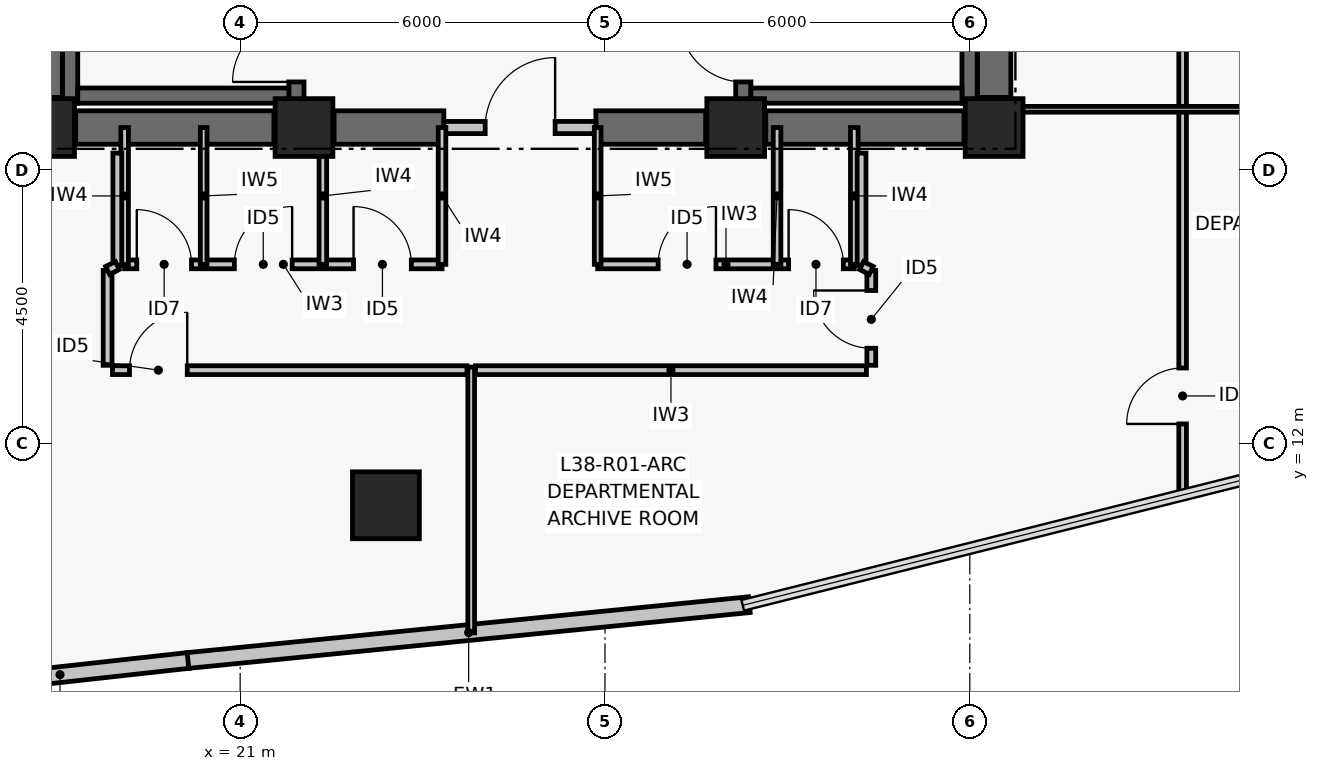
"""IFC4 building model, lengths in metres.
Left out: names, types, materials, properties, quantities, classifications, styles, units other than length and angle.
Written with IfcOpenShell. Run it as: python <this file> out.ifc"""

import sys

from ifc_helpers import new_model, si_unit, direction, frame, frame_2d, origin, origin_2d, place, context, subcontext, project, spatial, rectangle, hollow_rectangle, extrude, element, fill, save


model = new_model("IFC4")
c1 = context("Model", 3, precision=1e-05, world=origin(), true_north=direction((0.0, 1.0)))
c2 = subcontext(c1, "Body", "Model", "MODEL_VIEW")
j1 = project(units=[si_unit("LENGTHUNIT", "METRE"), si_unit("PLANEANGLEUNIT", "RADIAN")], contexts=[c1])
p1 = place(None, origin())
s1 = spatial("IfcSite", under=j1, at=p1, CompositionType="ELEMENT")
p2 = place(p1, origin())
s2 = spatial("IfcBuilding", under=s1, at=p2, CompositionType="ELEMENT")
p3 = place(p2, frame((0.0, 0.0, 154.32)))
s3 = spatial("IfcBuildingStorey", under=s2, at=p3, CompositionType="ELEMENT", Elevation=154.32)
for number, where, z_axis, x_axis in (
    (1, (17.8, 17.2, 0.0), (0.0, 0.0, 1.0), (1.0, 0.0, 0.0)),
    (2, (22.05, 17.2, 0.0), (0.0, 0.0, 1.0), (1.0, 0.0, 0.0)),
    (3, (29.15, 17.2, 0.0), (0.0, 0.0, 1.0), (1.0, 0.0, 0.0)),
    (4, (33.4, 17.2, 0.0), (0.0, 0.0, 1.0), (1.0, 0.0, 0.0)),
):
    element("IfcColumn", number, at=place(p3, frame(where, z_axis=z_axis, x_axis=x_axis)), inside=s3, PredefinedType="COLUMN", context=c2, shape_type="SweptSolid", body=[
        extrude(rectangle(XDim=0.95, YDim=0.95, at=origin_2d()), origin(), (0.0, 0.0, 1.0), 3.72),
    ])
p4 = place(p3, frame((18.295, 17.2, 0.0), z_axis=(0.0, 0.0, 1.0), x_axis=(1.0, 0.0, 0.0)))
e5 = element("IfcWall", 5, at=p4, inside=s3, PredefinedType="SHEAR", context=c2, shape_type="SweptSolid", body=[
    extrude(rectangle(XDim=3.26, YDim=0.55, at=frame_2d((1.63, 0.0))), origin(), (0.0, 0.0, 1.0), 3.5),
])
p5 = place(p3, frame((22.545, 17.2, 0.0), z_axis=(0.0, 0.0, 1.0), x_axis=(1.0, 0.0, 0.0)))
e6 = element("IfcWall", 6, at=p5, inside=s3, PredefinedType="SHEAR", context=c2, shape_type="SweptSolid", body=[
    extrude(rectangle(XDim=1.805, YDim=0.55, at=frame_2d((0.903, 0.0))), origin(), (0.0, 0.0, 1.0), 3.5),
])
p6 = place(p3, frame((26.85, 17.2, 0.0), z_axis=(0.0, 0.0, 1.0), x_axis=(1.0, 0.0, 0.0)))
e7 = element("IfcWall", 7, at=p6, inside=s3, PredefinedType="SHEAR", context=c2, shape_type="SweptSolid", body=[
    extrude(rectangle(XDim=1.805, YDim=0.55, at=frame_2d((0.902, 0.0))), origin(), (0.0, 0.0, 1.0), 3.5),
])
p7 = place(p3, frame((29.645, 17.2, 0.0), z_axis=(0.0, 0.0, 1.0), x_axis=(1.0, 0.0, 0.0)))
e8 = element("IfcWall", 8, at=p7, inside=s3, PredefinedType="SHEAR", context=c2, shape_type="SweptSolid", body=[
    extrude(rectangle(XDim=3.26, YDim=0.55, at=frame_2d((1.63, 0.0))), origin(), (0.0, 0.0, 1.0), 3.5),
])
for number, where, z_axis, x_axis in (
    (9, (17.8, 17.695, 0.0), (0.0, 0.0, 1.0), (0.0, 1.0, 0.0)),
    (10, (33.4, 17.695, 0.0), (0.0, 0.0, 1.0), (0.0, 1.0, 0.0)),
):
    element("IfcWall", number, at=place(p3, frame(where, z_axis=z_axis, x_axis=x_axis)), inside=s3, PredefinedType="SHEAR", context=c2, shape_type="SweptSolid", body=[
        extrude(rectangle(XDim=8.61, YDim=0.55, at=frame_2d((4.305, 0.0))), origin(), (0.0, 0.0, 1.0), 3.5),
    ])
p8 = place(p3, frame((18.204, 17.6, 0.0), z_axis=(0.0, 0.0, 1.0), x_axis=(0.0, 1.0, 0.0)))
e11 = element("IfcWall", 11, at=p8, inside=s3, PredefinedType="SHEAR", context=c2, shape_type="SweptSolid", body=[
    extrude(rectangle(XDim=8.8, YDim=0.25, at=frame_2d((4.4, 0.0))), origin(), (0.0, 0.0, 1.0), 3.5),
])
p9 = place(p3, frame((21.925, 17.6, 0.0), z_axis=(0.0, 0.0, 1.0), x_axis=(0.0, 1.0, 0.0)))
e12 = element("IfcWall", 12, at=p9, inside=s3, PredefinedType="SHEAR", context=c2, shape_type="SweptSolid", body=[
    extrude(rectangle(XDim=8.8, YDim=0.25, at=frame_2d((4.4, 0.0))), origin(), (0.0, 0.0, 1.0), 3.5),
])
p10 = place(p9, frame((0.35, 0.0, 0.0)))
e13 = element("IfcOpeningElement", 13, at=p10, cuts=e12, PredefinedType="OPENING", context=c2, shape_type="SweptSolid", body=[
    extrude(rectangle(XDim=1.05, YDim=2.08, at=frame_2d((0.525, 1.04))), frame((0.0, 0.135, 0.0), z_axis=(0.0, -1.0, 0.0), x_axis=(1.0, 0.0, 0.0)), (0.0, 0.0, 1.0), 0.27),
])
p11 = place(p3, frame((18.329, 17.725, 0.0), z_axis=(0.0, 0.0, 1.0), x_axis=(1.0, 0.0, 0.0)))
e14 = element("IfcWall", 14, at=p11, inside=s3, PredefinedType="SHEAR", context=c2, shape_type="SweptSolid", body=[
    extrude(rectangle(XDim=3.471, YDim=0.25, at=frame_2d((1.735, 0.0))), origin(), (0.0, 0.0, 1.0), 3.5),
])
p12 = place(p3, frame((29.275, 17.6, 0.0), z_axis=(0.0, 0.0, 1.0), x_axis=(0.0, 1.0, 0.0)))
e15 = element("IfcWall", 15, at=p12, inside=s3, PredefinedType="SHEAR", context=c2, shape_type="SweptSolid", body=[
    extrude(rectangle(XDim=8.8, YDim=0.25, at=frame_2d((4.4, 0.0))), origin(), (0.0, 0.0, 1.0), 3.5),
])
p13 = place(p12, frame((0.35, 0.0, 0.0)))
e16 = element("IfcOpeningElement", 16, at=p13, cuts=e15, PredefinedType="OPENING", context=c2, shape_type="SweptSolid", body=[
    extrude(rectangle(XDim=1.05, YDim=2.08, at=frame_2d((0.525, 1.04))), frame((0.0, 0.135, 0.0), z_axis=(0.0, -1.0, 0.0), x_axis=(1.0, 0.0, 0.0)), (0.0, 0.0, 1.0), 0.27),
])
p14 = place(p3, frame((32.996, 17.6, 0.0), z_axis=(0.0, 0.0, 1.0), x_axis=(0.0, 1.0, 0.0)))
e17 = element("IfcWall", 17, at=p14, inside=s3, PredefinedType="SHEAR", context=c2, shape_type="SweptSolid", body=[
    extrude(rectangle(XDim=8.8, YDim=0.25, at=frame_2d((4.4, 0.0))), origin(), (0.0, 0.0, 1.0), 3.5),
])
p15 = place(p3, frame((29.4, 17.725, 0.0), z_axis=(0.0, 0.0, 1.0), x_axis=(1.0, 0.0, 0.0)))
e18 = element("IfcWall", 18, at=p15, inside=s3, PredefinedType="SHEAR", context=c2, shape_type="SweptSolid", body=[
    extrude(rectangle(XDim=3.471, YDim=0.25, at=frame_2d((1.736, 0.0))), origin(), (0.0, 0.0, 1.0), 3.5),
])
p16 = place(p3, frame((23.397, 10.988, 0.0), z_axis=(0.0, 0.0, 1.0), x_axis=(1.0, 0.0, 0.0)))
e19 = element("IfcColumn", 19, at=p16, inside=s3, PredefinedType="COLUMN", context=c2, shape_type="SweptSolid", body=[
    extrude(hollow_rectangle(XDim=1.1, YDim=1.1, WallThickness=0.045, at=origin_2d()), origin(), (0.0, 0.0, 1.0), 3.72),
])
p17 = place(p3, frame((20.153, 8.437, 0.0), z_axis=(0.0, 0.0, 1.0), x_axis=(-0.993933978819, -0.109978387641, 0.0)))
e20 = element("IfcWall", 20, at=p17, inside=s3, PredefinedType="PARTITIONING", context=c2, shape_type="SweptSolid", body=[
    extrude(rectangle(XDim=4.258, YDim=0.26, at=frame_2d((2.129, 0.0))), origin(), (0.0, 0.0, 1.0), 3.5),
])
p18 = place(p3, frame((29.375, 9.354, 0.0), z_axis=(0.0, 0.0, 1.0), x_axis=(-0.9950896707, -0.098977508888, 0.0)))
e21 = element("IfcWall", 21, at=p18, inside=s3, PredefinedType="PARTITIONING", context=c2, shape_type="SweptSolid", body=[
    extrude(rectangle(XDim=9.28, YDim=0.26, at=frame_2d((4.64, 0.0))), origin(), (0.0, 0.0, 1.0), 3.5),
])
p19 = place(p3, frame((24.35, 17.2, 0.0), z_axis=(0.0, 0.0, 1.0), x_axis=(1.0, 0.0, 0.0)))
e22 = element("IfcWall", 22, at=p19, inside=s3, PredefinedType="PARTITIONING", context=c2, shape_type="SweptSolid", body=[
    extrude(rectangle(XDim=2.5, YDim=0.2, at=frame_2d((1.25, 0.0))), origin(), (0.0, 0.0, 1.0), 2.63),
])
p20 = place(p19, frame((0.68, 0.0, 0.0)))
e23 = element("IfcOpeningElement", 23, at=p20, cuts=e22, PredefinedType="OPENING", context=c2, shape_type="SweptSolid", body=[
    extrude(rectangle(XDim=1.15, YDim=2.08, at=frame_2d((0.575, 1.04))), frame((0.0, 0.11, 0.0), z_axis=(0.0, -1.0, 0.0), x_axis=(1.0, 0.0, 0.0)), (0.0, 0.0, 1.0), 0.22),
])
p21 = place(p3, frame((19.1, 14.95, 0.0), z_axis=(0.0, 0.0, 1.0), x_axis=(1.0, 0.0, 0.0)))
e24 = element("IfcWall", 24, at=p21, inside=s3, PredefinedType="PARTITIONING", context=c2, shape_type="SweptSolid", body=[
    extrude(rectangle(XDim=5.22, YDim=0.145, at=frame_2d((2.61, 0.0))), origin(), (0.0, 0.0, 1.0), 2.73),
])
p22 = place(p21, frame((0.2, 0.0, 0.0)))
e25 = element("IfcOpeningElement", 25, at=p22, cuts=e24, PredefinedType="OPENING", context=c2, shape_type="SweptSolid", body=[
    extrude(rectangle(XDim=0.9, YDim=2.02, at=frame_2d((0.45, 1.01))), frame((0.0, 0.083, 0.0), z_axis=(0.0, -1.0, 0.0), x_axis=(1.0, 0.0, 0.0)), (0.0, 0.0, 1.0), 0.165),
])
p23 = place(p21, frame((1.805, 0.0, 0.0)))
e26 = element("IfcOpeningElement", 26, at=p23, cuts=e24, PredefinedType="OPENING", context=c2, shape_type="SweptSolid", body=[
    extrude(rectangle(XDim=0.95, YDim=2.06, at=frame_2d((0.475, 1.03))), frame((0.0, 0.083, 0.0), z_axis=(0.0, -1.0, 0.0), x_axis=(1.0, 0.0, 0.0)), (0.0, 0.0, 1.0), 0.165),
])
p24 = place(p21, frame((3.765, 0.0, 0.0)))
e27 = element("IfcOpeningElement", 27, at=p24, cuts=e24, PredefinedType="OPENING", context=c2, shape_type="SweptSolid", body=[
    extrude(rectangle(XDim=0.95, YDim=2.06, at=frame_2d((0.475, 1.03))), frame((0.0, 0.083, 0.0), z_axis=(0.0, -1.0, 0.0), x_axis=(1.0, 0.0, 0.0)), (0.0, 0.0, 1.0), 0.165),
])
p25 = place(p3, frame((26.88, 14.95, 0.0), z_axis=(0.0, 0.0, 1.0), x_axis=(1.0, 0.0, 0.0)))
e28 = element("IfcWall", 28, at=p25, inside=s3, PredefinedType="PARTITIONING", context=c2, shape_type="SweptSolid", body=[
    extrude(rectangle(XDim=4.22, YDim=0.145, at=frame_2d((2.11, 0.0))), origin(), (0.0, 0.0, 1.0), 2.93),
])
p26 = place(p25, frame((0.995, 0.0, 0.0)))
e29 = element("IfcOpeningElement", 29, at=p26, cuts=e28, PredefinedType="OPENING", context=c2, shape_type="SweptSolid", body=[
    extrude(rectangle(XDim=0.95, YDim=2.06, at=frame_2d((0.475, 1.03))), frame((0.0, 0.083, 0.0), z_axis=(0.0, -1.0, 0.0), x_axis=(1.0, 0.0, 0.0)), (0.0, 0.0, 1.0), 0.165),
])
p27 = place(p25, frame((3.14, 0.0, 0.0)))
e30 = element("IfcOpeningElement", 30, at=p27, cuts=e28, PredefinedType="OPENING", context=c2, shape_type="SweptSolid", body=[
    extrude(rectangle(XDim=0.9, YDim=2.02, at=frame_2d((0.45, 1.01))), frame((0.0, 0.083, 0.0), z_axis=(0.0, -1.0, 0.0), x_axis=(1.0, 0.0, 0.0)), (0.0, 0.0, 1.0), 0.165),
])
p28 = place(p3, frame((19.1, 14.95, 0.0), z_axis=(0.0, 0.0, 1.0), x_axis=(0.0, 1.0, 0.0)))
e31 = element("IfcWall", 31, at=p28, inside=s3, PredefinedType="PARTITIONING", context=c2, shape_type="SweptSolid", body=[
    extrude(rectangle(XDim=2.25, YDim=0.125, at=frame_2d((1.125, 0.0))), origin(), (0.0, 0.0, 1.0), 2.63),
])
p29 = place(p3, frame((20.4, 14.95, 0.0), z_axis=(0.0, 0.0, 1.0), x_axis=(0.0, 1.0, 0.0)))
e32 = element("IfcWall", 32, at=p29, inside=s3, PredefinedType="PARTITIONING", context=c2, shape_type="SweptSolid", body=[
    extrude(rectangle(XDim=2.25, YDim=0.11, at=frame_2d((1.125, 0.0))), origin(), (0.0, 0.0, 1.0), 2.63),
])
for number, where, z_axis, x_axis in (
    (33, (22.36, 14.95, 0.0), (0.0, 0.0, 1.0), (0.0, 1.0, 0.0)),
    (34, (24.32, 14.95, 0.0), (0.0, 0.0, 1.0), (0.0, 1.0, 0.0)),
):
    element("IfcWall", number, at=place(p3, frame(where, z_axis=z_axis, x_axis=x_axis)), inside=s3, PredefinedType="PARTITIONING", context=c2, shape_type="SweptSolid", body=[
        extrude(rectangle(XDim=2.25, YDim=0.125, at=frame_2d((1.125, 0.0))), origin(), (0.0, 0.0, 1.0), 2.63),
    ])
p30 = place(p3, frame((26.88, 14.95, 0.0), z_axis=(0.0, 0.0, 1.0), x_axis=(0.0, 1.0, 0.0)))
e35 = element("IfcWall", 35, at=p30, inside=s3, PredefinedType="PARTITIONING", context=c2, shape_type="SweptSolid", body=[
    extrude(rectangle(XDim=2.25, YDim=0.11, at=frame_2d((1.125, 0.0))), origin(), (0.0, 0.0, 1.0), 2.63),
])
for number, where, z_axis, x_axis in (
    (36, (29.83, 14.95, 0.0), (0.0, 0.0, 1.0), (0.0, 1.0, 0.0)),
    (37, (31.1, 14.95, 0.0), (0.0, 0.0, 1.0), (0.0, 1.0, 0.0)),
):
    element("IfcWall", number, at=place(p3, frame(where, z_axis=z_axis, x_axis=x_axis)), inside=s3, PredefinedType="PARTITIONING", context=c2, shape_type="SweptSolid", body=[
        extrude(rectangle(XDim=2.25, YDim=0.125, at=frame_2d((1.125, 0.0))), origin(), (0.0, 0.0, 1.0), 2.63),
    ])
p31 = place(p3, frame((24.87, 13.21, 0.0), z_axis=(0.0, 0.0, 1.0), x_axis=(1.0, 0.0, 0.0)))
e38 = element("IfcWall", 38, at=p31, inside=s3, PredefinedType="PARTITIONING", context=c2, shape_type="SweptSolid", body=[
    extrude(rectangle(XDim=6.43, YDim=0.145, at=frame_2d((3.215, 0.0))), origin(), (0.0, 0.0, 1.0), 2.93),
])
p32 = place(p3, frame((31.38, 13.29, 0.0), z_axis=(0.0, 0.0, 1.0), x_axis=(0.0, 1.0, 0.0)))
e39 = element("IfcWall", 39, at=p32, inside=s3, PredefinedType="PARTITIONING", context=c2, shape_type="SweptSolid", body=[
    extrude(rectangle(XDim=1.56, YDim=0.145, at=frame_2d((0.78, 0.0))), origin(), (0.0, 0.0, 1.0), 3.5),
])
p33 = place(p32, frame((0.28, 0.0, 0.0)))
e40 = element("IfcOpeningElement", 40, at=p33, cuts=e39, PredefinedType="OPENING", context=c2, shape_type="SweptSolid", body=[
    extrude(rectangle(XDim=0.95, YDim=2.06, at=frame_2d((0.475, 1.03))), frame((0.0, 0.083, 0.0), z_axis=(0.0, -1.0, 0.0), x_axis=(1.0, 0.0, 0.0)), (0.0, 0.0, 1.0), 0.165),
])
for number, where, z_axis, x_axis in (
    (41, (31.22, 14.93, 0.0), (0.0, 0.0, 1.0), (0.0, 1.0, 0.0)),
    (42, (18.98, 16.78, 0.0), (0.0, 0.0, 1.0), (0.0, -1.0, 0.0)),
):
    element("IfcWall", number, at=place(p3, frame(where, z_axis=z_axis, x_axis=x_axis)), inside=s3, PredefinedType="PARTITIONING", context=c2, shape_type="SweptSolid", body=[
        extrude(rectangle(XDim=1.85, YDim=0.145, at=frame_2d((0.925, 0.0))), origin(), (0.0, 0.0, 1.0), 2.63),
    ])
p34 = place(p3, frame((18.82, 14.85, 0.0), z_axis=(0.0, 0.0, 1.0), x_axis=(0.0, -1.0, 0.0)))
e43 = element("IfcWall", 43, at=p34, inside=s3, PredefinedType="PARTITIONING", context=c2, shape_type="SweptSolid", body=[
    extrude(rectangle(XDim=1.56, YDim=0.145, at=frame_2d((0.78, 0.0))), origin(), (0.0, 0.0, 1.0), 3.08),
])
p35 = place(p3, frame((18.9, 13.21, 0.0), z_axis=(0.0, 0.0, 1.0), x_axis=(1.0, 0.0, 0.0)))
e44 = element("IfcWall", 44, at=p35, inside=s3, PredefinedType="PARTITIONING", context=c2, shape_type="SweptSolid", body=[
    extrude(rectangle(XDim=5.83, YDim=0.145, at=frame_2d((2.915, 0.0))), origin(), (0.0, 0.0, 1.0), 2.73),
])
p36 = place(p35, frame((0.28, 0.0, 0.0)))
e45 = element("IfcOpeningElement", 45, at=p36, cuts=e44, PredefinedType="OPENING", context=c2, shape_type="SweptSolid", body=[
    extrude(rectangle(XDim=0.95, YDim=2.06, at=frame_2d((0.475, 1.03))), frame((0.0, 0.083, 0.0), z_axis=(0.0, -1.0, 0.0), x_axis=(1.0, 0.0, 0.0)), (0.0, 0.0, 1.0), 0.165),
])
p37 = place(p3, frame((24.8, 8.889, 0.0), z_axis=(0.0, 0.0, 1.0), x_axis=(0.0, 1.0, 0.0)))
e46 = element("IfcWall", 46, at=p37, inside=s3, PredefinedType="PARTITIONING", context=c2, shape_type="SweptSolid", body=[
    extrude(rectangle(XDim=4.371, YDim=0.11, at=frame_2d((2.186, 0.0))), origin(), (0.0, 0.0, 1.0), 2.93),
])
p38 = place(p3, frame((36.5, 11.146, 0.0), z_axis=(0.0, 0.0, 1.0), x_axis=(0.0, 1.0, 0.0)))
e47 = element("IfcWall", 47, at=p38, inside=s3, PredefinedType="PARTITIONING", context=c2, shape_type="SweptSolid", body=[
    extrude(rectangle(XDim=21.708, YDim=0.125, at=frame_2d((10.854, 0.0))), origin(), (0.0, 0.0, 1.0), 2.73),
])
p39 = place(p38, frame((1.18, 0.0, 0.0)))
e48 = element("IfcOpeningElement", 48, at=p39, cuts=e47, PredefinedType="OPENING", context=c2, shape_type="SweptSolid", body=[
    extrude(rectangle(XDim=0.92, YDim=2.05, at=frame_2d((0.46, 1.025))), frame((0.0, 0.073, 0.0), z_axis=(0.0, -1.0, 0.0), x_axis=(1.0, 0.0, 0.0)), (0.0, 0.0, 1.0), 0.145),
])
p40 = place(p38, frame((9.42, 0.0, 0.0)))
e49 = element("IfcOpeningElement", 49, at=p40, cuts=e47, PredefinedType="OPENING", context=c2, shape_type="SweptSolid", body=[
    extrude(rectangle(XDim=0.92, YDim=2.05, at=frame_2d((0.46, 1.025))), frame((0.0, 0.073, 0.0), z_axis=(0.0, -1.0, 0.0), x_axis=(1.0, 0.0, 0.0)), (0.0, 0.0, 1.0), 0.145),
])
p41 = place(p38, frame((19.609, 0.0, 0.0)))
e50 = element("IfcOpeningElement", 50, at=p41, cuts=e47, PredefinedType="OPENING", context=c2, shape_type="SweptSolid", body=[
    extrude(rectangle(XDim=0.92, YDim=2.05, at=frame_2d((0.46, 1.025))), frame((0.0, 0.073, 0.0), z_axis=(0.0, -1.0, 0.0), x_axis=(1.0, 0.0, 0.0)), (0.0, 0.0, 1.0), 0.145),
])
p42 = place(p3, frame((33.77, 17.5, 0.0), z_axis=(0.0, 0.0, 1.0), x_axis=(1.0, 0.0, 0.0)))
e51 = element("IfcWall", 51, at=p42, inside=s3, PredefinedType="PARTITIONING", context=c2, shape_type="SweptSolid", body=[
    extrude(rectangle(XDim=16.681, YDim=0.095, at=frame_2d((8.34, 0.0))), origin(), (0.0, 0.0, 1.0), 2.63),
])
p43 = place(p42, frame((6.024, 0.0, 0.0)))
e52 = element("IfcOpeningElement", 52, at=p43, cuts=e51, PredefinedType="OPENING", context=c2, shape_type="SweptSolid", body=[
    extrude(rectangle(XDim=0.92, YDim=2.05, at=frame_2d((0.46, 1.025))), frame((0.0, 0.057, 0.0), z_axis=(0.0, -1.0, 0.0), x_axis=(1.0, 0.0, 0.0)), (0.0, 0.0, 1.0), 0.115),
])
for number, where, z_axis, x_axis in (
    (53, (31.38, 14.85, 0.0), (0.0, 0.0, 1.0), (-0.895, 0.447, 0.0)),
    (54, (18.82, 14.85, 0.0), (0.0, 0.0, 1.0), (0.895, 0.447, 0.0)),
):
    element("IfcWall", number, at=place(p3, frame(where, z_axis=z_axis, x_axis=x_axis)), inside=s3, PredefinedType="PARTITIONING", context=c2, shape_type="SweptSolid", body=[
        extrude(rectangle(XDim=0.179, YDim=0.145, at=frame_2d((0.089, 0.0))), origin(), (0.0, 0.0, 1.0), 3.5),
    ])
p44 = place(p10, origin())
e55 = element("IfcDoor", 55, at=p44, inside=s3, OperationType="SINGLE_SWING_LEFT", PredefinedType="DOOR", context=c2, shape_type="SweptSolid", body=[
    extrude(rectangle(XDim=1.05, YDim=2.08, at=frame_2d((0.525, 1.04))), frame((0.0, 0.025, 0.0), z_axis=(0.0, -1.0, 0.0), x_axis=(1.0, 0.0, 0.0)), (0.0, 0.0, 1.0), 0.05),
])
fill(e13, e55)
p45 = place(p13, origin())
e56 = element("IfcDoor", 56, at=p45, inside=s3, OperationType="SINGLE_SWING_RIGHT", PredefinedType="DOOR", context=c2, shape_type="SweptSolid", body=[
    extrude(rectangle(XDim=1.05, YDim=2.08, at=frame_2d((0.525, 1.04))), frame((0.0, 0.025, 0.0), z_axis=(0.0, -1.0, 0.0), x_axis=(1.0, 0.0, 0.0)), (0.0, 0.0, 1.0), 0.05),
])
fill(e16, e56)
p46 = place(p20, origin())
e57 = element("IfcDoor", 57, at=p46, inside=s3, OperationType="SINGLE_SWING_RIGHT", PredefinedType="DOOR", context=c2, shape_type="SweptSolid", body=[
    extrude(rectangle(XDim=1.15, YDim=2.08, at=frame_2d((0.575, 1.04))), frame((0.0, 0.025, 0.0), z_axis=(0.0, -1.0, 0.0), x_axis=(1.0, 0.0, 0.0)), (0.0, 0.0, 1.0), 0.05),
])
fill(e23, e57)
p47 = place(p22, origin())
e58 = element("IfcDoor", 58, at=p47, inside=s3, OperationType="SINGLE_SWING_LEFT", PredefinedType="DOOR", context=c2, shape_type="SweptSolid", body=[
    extrude(rectangle(XDim=0.9, YDim=2.02, at=frame_2d((0.45, 1.01))), frame((0.0, 0.025, 0.0), z_axis=(0.0, -1.0, 0.0), x_axis=(1.0, 0.0, 0.0)), (0.0, 0.0, 1.0), 0.05),
])
fill(e25, e58)
p48 = place(p23, origin())
e59 = element("IfcDoor", 59, at=p48, inside=s3, OperationType="SINGLE_SWING_RIGHT", PredefinedType="DOOR", context=c2, shape_type="SweptSolid", body=[
    extrude(rectangle(XDim=0.95, YDim=2.06, at=frame_2d((0.475, 1.03))), frame((0.0, 0.025, 0.0), z_axis=(0.0, -1.0, 0.0), x_axis=(1.0, 0.0, 0.0)), (0.0, 0.0, 1.0), 0.05),
])
fill(e26, e59)
p49 = place(p24, origin())
e60 = element("IfcDoor", 60, at=p49, inside=s3, OperationType="SINGLE_SWING_LEFT", PredefinedType="DOOR", context=c2, shape_type="SweptSolid", body=[
    extrude(rectangle(XDim=0.95, YDim=2.06, at=frame_2d((0.475, 1.03))), frame((0.0, 0.025, 0.0), z_axis=(0.0, -1.0, 0.0), x_axis=(1.0, 0.0, 0.0)), (0.0, 0.0, 1.0), 0.05),
])
fill(e27, e60)
p50 = place(p26, origin())
e61 = element("IfcDoor", 61, at=p50, inside=s3, OperationType="SINGLE_SWING_RIGHT", PredefinedType="DOOR", context=c2, shape_type="SweptSolid", body=[
    extrude(rectangle(XDim=0.95, YDim=2.06, at=frame_2d((0.475, 1.03))), frame((0.0, 0.025, 0.0), z_axis=(0.0, -1.0, 0.0), x_axis=(1.0, 0.0, 0.0)), (0.0, 0.0, 1.0), 0.05),
])
fill(e29, e61)
p51 = place(p27, origin())
e62 = element("IfcDoor", 62, at=p51, inside=s3, OperationType="SINGLE_SWING_LEFT", PredefinedType="DOOR", context=c2, shape_type="SweptSolid", body=[
    extrude(rectangle(XDim=0.9, YDim=2.02, at=frame_2d((0.45, 1.01))), frame((0.0, 0.025, 0.0), z_axis=(0.0, -1.0, 0.0), x_axis=(1.0, 0.0, 0.0)), (0.0, 0.0, 1.0), 0.05),
])
fill(e30, e62)
p52 = place(p33, origin())
e63 = element("IfcDoor", 63, at=p52, inside=s3, OperationType="SINGLE_SWING_RIGHT", PredefinedType="DOOR", context=c2, shape_type="SweptSolid", body=[
    extrude(rectangle(XDim=0.95, YDim=2.06, at=frame_2d((0.475, 1.03))), frame((0.0, 0.025, 0.0), z_axis=(0.0, -1.0, 0.0), x_axis=(1.0, 0.0, 0.0)), (0.0, 0.0, 1.0), 0.05),
])
fill(e40, e63)
p53 = place(p36, origin())
e64 = element("IfcDoor", 64, at=p53, inside=s3, OperationType="SINGLE_SWING_RIGHT", PredefinedType="DOOR", context=c2, shape_type="SweptSolid", body=[
    extrude(rectangle(XDim=0.95, YDim=2.06, at=frame_2d((0.475, 1.03))), frame((0.0, 0.025, 0.0), z_axis=(0.0, -1.0, 0.0), x_axis=(1.0, 0.0, 0.0)), (0.0, 0.0, 1.0), 0.05),
])
fill(e45, e64)
p54 = place(p39, origin())
e65 = element("IfcDoor", 65, at=p54, inside=s3, OperationType="SINGLE_SWING_LEFT", PredefinedType="DOOR", context=c2, shape_type="SweptSolid", body=[
    extrude(rectangle(XDim=0.92, YDim=2.05, at=frame_2d((0.46, 1.025))), frame((0.0, 0.025, 0.0), z_axis=(0.0, -1.0, 0.0), x_axis=(1.0, 0.0, 0.0)), (0.0, 0.0, 1.0), 0.05),
])
fill(e48, e65)
save(model, sys.argv[1])
